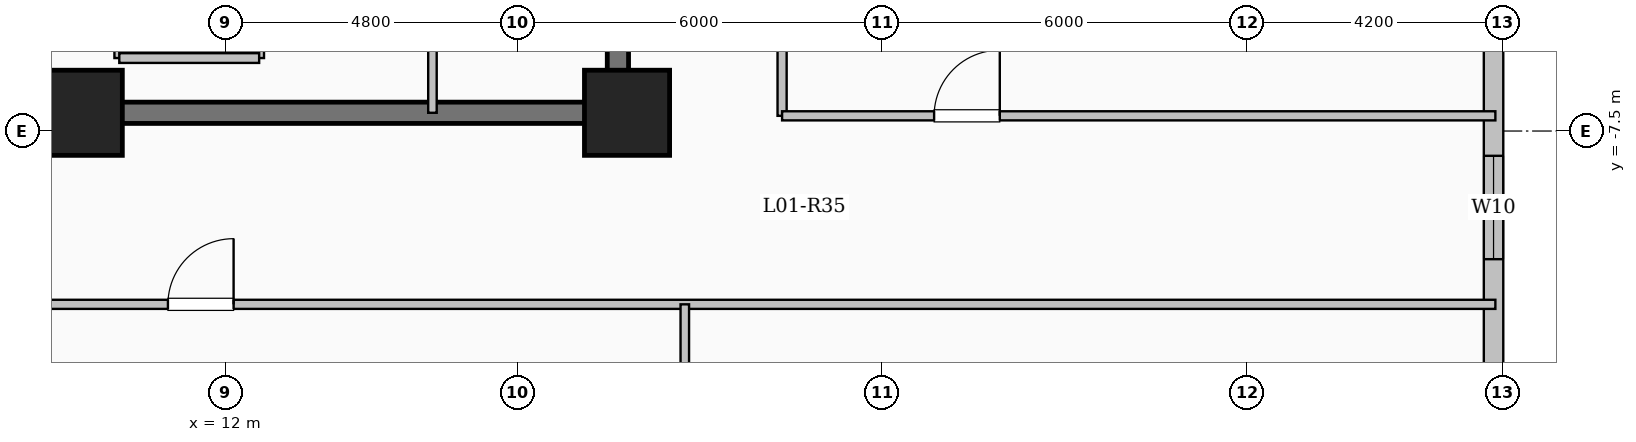
"""IFC4 building model, lengths in metres.
Left out: names, types, materials, properties, quantities, classifications, styles, units other than length and angle.
Written with IfcOpenShell. Run it as: python <this file> out.ifc"""

import sys

from ifc_helpers import new_model, si_unit, direction, frame, frame_2d, origin, origin_2d, place, context, subcontext, project, spatial, rectangle, extrude, element, fill, save


model = new_model("IFC4")
c1 = context("Model", 3, precision=1e-05, world=origin(), true_north=direction((0.0, 1.0)))
c2 = subcontext(c1, "Body", "Model", "MODEL_VIEW")
j1 = project(units=[si_unit("LENGTHUNIT", "METRE"), si_unit("PLANEANGLEUNIT", "RADIAN")], contexts=[c1])
p1 = place(None, origin())
s1 = spatial("IfcSite", under=j1, at=p1, CompositionType="ELEMENT")
p2 = place(p1, origin())
s2 = spatial("IfcBuilding", under=s1, at=p2, CompositionType="ELEMENT")
p3 = place(p2, frame((0.0, 0.0, 5.4)))
s3 = spatial("IfcBuildingStorey", under=s2, at=p3, CompositionType="ELEMENT", Elevation=5.4)
for number, where, z_axis, x_axis in (
    (1, (9.6, -7.2, 0.0), (0.0, 0.0, 1.0), (1.0, 0.0, 0.0)),
    (2, (18.6, -7.2, 0.0), (0.0, 0.0, 1.0), (1.0, 0.0, 0.0)),
):
    element("IfcColumn", number, at=place(p3, frame(where, z_axis=z_axis, x_axis=x_axis)), inside=s3, PredefinedType="COLUMN", context=c2, shape_type="SweptSolid", body=[
        extrude(rectangle(XDim=1.4, YDim=1.4, at=origin_2d()), origin(), (0.0, 0.0, 1.0), 4.5),
    ])
p4 = place(p3, frame((32.85, 29.85, 0.0), z_axis=(0.0, 0.0, 1.0), x_axis=(0.0, -1.0, 0.0)))
e3 = element("IfcWall", 3, at=p4, inside=s3, PredefinedType="SOLIDWALL", context=c2, shape_type="SweptSolid", body=[
    extrude(rectangle(XDim=59.7, YDim=0.32, at=frame_2d((29.85, 0.0))), origin(), (0.0, 0.0, 1.0), 4.2),
])
p5 = place(p4, frame((7.6, 0.0, 0.9)))
e4 = element("IfcOpeningElement", 4, at=p5, cuts=e3, PredefinedType="OPENING", context=c2, shape_type="SweptSolid", body=[
    extrude(rectangle(XDim=2.1, YDim=2.0, at=frame_2d((1.05, 1.0))), frame((0.0, 0.17, 0.0), z_axis=(0.0, -1.0, 0.0), x_axis=(1.0, 0.0, 0.0)), (0.0, 0.0, 1.0), 0.34),
])
p6 = place(p4, frame((17.725, 0.0, 0.95)))
e5 = element("IfcOpeningElement", 5, at=p6, cuts=e3, PredefinedType="OPENING", context=c2, shape_type="SweptSolid", body=[
    extrude(rectangle(XDim=1.0, YDim=1.5, at=frame_2d((0.5, 0.75))), frame((0.0, 0.17, 0.0), z_axis=(0.0, -1.0, 0.0), x_axis=(1.0, 0.0, 0.0)), (0.0, 0.0, 1.0), 0.34),
])
p7 = place(p4, frame((27.05, 0.0, 0.9)))
e6 = element("IfcOpeningElement", 6, at=p7, cuts=e3, PredefinedType="OPENING", context=c2, shape_type="SweptSolid", body=[
    extrude(rectangle(XDim=2.1, YDim=2.0, at=frame_2d((1.05, 1.0))), frame((0.0, 0.17, 0.0), z_axis=(0.0, -1.0, 0.0), x_axis=(1.0, 0.0, 0.0)), (0.0, 0.0, 1.0), 0.34),
])
p8 = place(p4, frame((37.758, 0.0, 0.9)))
e7 = element("IfcOpeningElement", 7, at=p8, cuts=e3, PredefinedType="OPENING", context=c2, shape_type="SweptSolid", body=[
    extrude(rectangle(XDim=1.7, YDim=1.9, at=frame_2d((0.85, 0.95))), frame((0.0, 0.17, 0.0), z_axis=(0.0, -1.0, 0.0), x_axis=(1.0, 0.0, 0.0)), (0.0, 0.0, 1.0), 0.34),
])
for number, where, z_axis, x_axis in (
    (8, (10.25, -6.3, 0.0), (0.0, 0.0, 1.0), (0.0, 1.0, 0.0)),
    (9, (12.55, -6.3, 0.0), (0.0, 0.0, 1.0), (0.0, 1.0, 0.0)),
):
    element("IfcWall", number, at=place(p3, frame(where, z_axis=z_axis, x_axis=x_axis)), inside=s3, PredefinedType="SOLIDWALL", context=c2, shape_type="SweptSolid", body=[
        extrude(rectangle(XDim=2.6, YDim=0.16, at=frame_2d((1.3, 0.0))), origin(), (0.0, 0.0, 1.0), 4.2),
    ])
p9 = place(p3, frame((10.25, -6.3, 0.0), z_axis=(0.0, 0.0, 1.0), x_axis=(1.0, 0.0, 0.0)))
e10 = element("IfcWall", 10, at=p9, inside=s3, PredefinedType="SOLIDWALL", context=c2, shape_type="SweptSolid", body=[
    extrude(rectangle(XDim=2.3, YDim=0.16, at=frame_2d((1.15, 0.0))), origin(), (0.0, 0.0, 1.0), 4.2),
])
p10 = place(p3, frame((18.45, -7.375, 0.0), z_axis=(0.0, 0.0, 1.0), x_axis=(0.0, 1.0, 0.0)))
e11 = element("IfcWall", 11, at=p10, inside=s3, PredefinedType="SHEAR", context=c2, shape_type="SweptSolid", body=[
    extrude(rectangle(XDim=14.05, YDim=0.35, at=frame_2d((7.025, 0.0))), origin(), (0.0, 0.0, 1.0), 4.5),
])
p11 = place(p3, frame((10.075, -7.2, 0.0), z_axis=(0.0, 0.0, 1.0), x_axis=(1.0, 0.0, 0.0)))
e12 = element("IfcWall", 12, at=p11, inside=s3, PredefinedType="SHEAR", context=c2, shape_type="SweptSolid", body=[
    extrude(rectangle(XDim=8.55, YDim=0.35, at=frame_2d((4.275, 0.0))), origin(), (0.0, 0.0, 1.0), 4.5),
])
p12 = place(p3, frame((15.4, -7.2, 0.0), z_axis=(0.0, 0.0, 1.0), x_axis=(0.0, 1.0, 0.0)))
e13 = element("IfcWall", 13, at=p12, inside=s3, PredefinedType="PARTITIONING", context=c2, shape_type="SweptSolid", body=[
    extrude(rectangle(XDim=10.45, YDim=0.14, at=frame_2d((5.225, 0.0))), origin(), (0.0, 0.0, 1.0), 4.2),
])
p13 = place(p12, frame((9.25, 0.0, 0.0)))
e14 = element("IfcOpeningElement", 14, at=p13, cuts=e13, PredefinedType="OPENING", context=c2, shape_type="SweptSolid", body=[
    extrude(rectangle(XDim=0.9, YDim=2.08, at=frame_2d((0.45, 1.04))), frame((0.0, 0.08, 0.0), z_axis=(0.0, -1.0, 0.0), x_axis=(1.0, 0.0, 0.0)), (0.0, 0.0, 1.0), 0.16),
])
p14 = place(p3, frame((21.15, -7.25, 0.0), z_axis=(0.0, 0.0, 1.0), x_axis=(0.0, 1.0, 0.0)))
e15 = element("IfcWall", 15, at=p14, inside=s3, PredefinedType="PARTITIONING", context=c2, shape_type="SweptSolid", body=[
    extrude(rectangle(XDim=18.0, YDim=0.15, at=frame_2d((9.0, 0.0))), origin(), (0.0, 0.0, 1.0), 4.2),
])
p15 = place(p3, frame((8.55, -10.35, 0.0), z_axis=(0.0, 0.0, 1.0), x_axis=(1.0, 0.0, 0.0)))
e16 = element("IfcWall", 16, at=p15, inside=s3, PredefinedType="PARTITIONING", context=c2, shape_type="SweptSolid", body=[
    extrude(rectangle(XDim=24.33, YDim=0.15, at=frame_2d((12.165, 0.0))), origin(), (0.0, 0.0, 1.0), 4.2),
])
p16 = place(p15, frame((2.5, 0.0, 0.0)))
e17 = element("IfcOpeningElement", 17, at=p16, cuts=e16, PredefinedType="OPENING", context=c2, shape_type="SweptSolid", body=[
    extrude(rectangle(XDim=1.08, YDim=2.15, at=frame_2d((0.54, 1.075))), frame((0.0, 0.085, 0.0), z_axis=(0.0, -1.0, 0.0), x_axis=(1.0, 0.0, 0.0)), (0.0, 0.0, 1.0), 0.17),
])
p17 = place(p3, frame((19.55, -19.56, 0.0), z_axis=(0.0, 0.0, 1.0), x_axis=(0.0, 1.0, 0.0)))
e18 = element("IfcWall", 18, at=p17, inside=s3, PredefinedType="PARTITIONING", context=c2, shape_type="SweptSolid", body=[
    extrude(rectangle(XDim=9.21, YDim=0.14, at=frame_2d((4.605, 0.0))), origin(), (0.0, 0.0, 1.0), 4.2),
])
p18 = place(p3, frame((21.15, -7.25, 0.0), z_axis=(0.0, 0.0, 1.0), x_axis=(1.0, 0.0, 0.0)))
e19 = element("IfcWall", 19, at=p18, inside=s3, PredefinedType="PARTITIONING", context=c2, shape_type="SweptSolid", body=[
    extrude(rectangle(XDim=11.73, YDim=0.15, at=frame_2d((5.865, 0.0))), origin(), (0.0, 0.0, 1.0), 4.2),
])
p19 = place(p18, frame((2.5, 0.0, 0.0)))
e20 = element("IfcOpeningElement", 20, at=p19, cuts=e19, PredefinedType="OPENING", context=c2, shape_type="SweptSolid", body=[
    extrude(rectangle(XDim=1.08, YDim=2.15, at=frame_2d((0.54, 1.075))), frame((0.0, 0.085, 0.0), z_axis=(0.0, -1.0, 0.0), x_axis=(1.0, 0.0, 0.0)), (0.0, 0.0, 1.0), 0.17),
])
p20 = place(p8, origin())
e21 = element("IfcWindow", 21, at=p20, inside=s3, PartitioningType="SINGLE_PANEL", PredefinedType="WINDOW", context=c2, shape_type="SweptSolid", body=[
    extrude(rectangle(XDim=1.7, YDim=1.9, at=frame_2d((0.85, 0.95))), frame((0.0, 0.03, 0.0), z_axis=(0.0, -1.0, 0.0), x_axis=(1.0, 0.0, 0.0)), (0.0, 0.0, 1.0), 0.06),
])
fill(e7, e21)
p21 = place(p16, origin())
e22 = element("IfcDoor", 22, at=p21, inside=s3, OperationType="SINGLE_SWING_RIGHT", PredefinedType="DOOR", context=c2, shape_type="SweptSolid", body=[
    extrude(rectangle(XDim=1.08, YDim=2.15, at=frame_2d((0.54, 1.075))), frame((0.0, 0.025, 0.0), z_axis=(0.0, -1.0, 0.0), x_axis=(1.0, 0.0, 0.0)), (0.0, 0.0, 1.0), 0.05),
])
fill(e17, e22)
p22 = place(p19, origin())
e23 = element("IfcDoor", 23, at=p22, inside=s3, OperationType="SINGLE_SWING_RIGHT", PredefinedType="DOOR", context=c2, shape_type="SweptSolid", body=[
    extrude(rectangle(XDim=1.08, YDim=2.15, at=frame_2d((0.54, 1.075))), frame((0.0, 0.025, 0.0), z_axis=(0.0, -1.0, 0.0), x_axis=(1.0, 0.0, 0.0)), (0.0, 0.0, 1.0), 0.05),
])
fill(e20, e23)
save(model, sys.argv[1])
